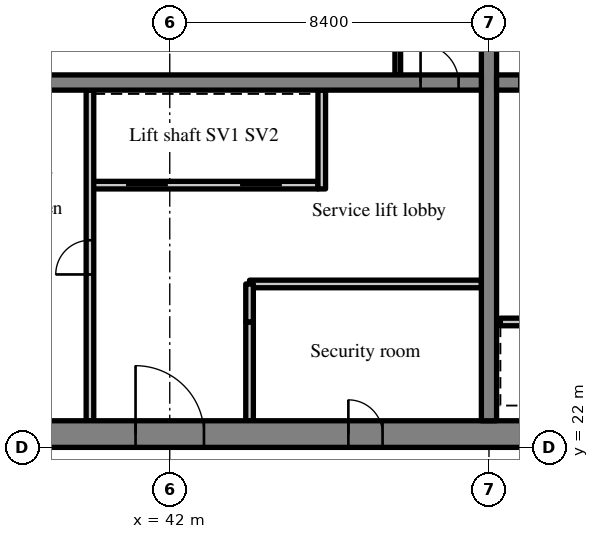
"""IFC4 building model, lengths in metres.
Left out: names, types, materials, properties, quantities, classifications, styles, units other than length and angle.
Written with IfcOpenShell. Run it as: python <this file> out.ifc"""

import sys

from ifc_helpers import new_model, si_unit, direction, frame, frame_2d, origin, place, context, subcontext, project, spatial, rectangle, extrude, source, transform, mapped, element, fill, save


model = new_model("IFC4")
c1 = context("Model", 3, precision=1e-05, world=origin(), true_north=direction((0.0, 1.0)))
c2 = subcontext(c1, "Body", "Model", "MODEL_VIEW")
j1 = project(units=[si_unit("LENGTHUNIT", "METRE"), si_unit("PLANEANGLEUNIT", "RADIAN")], contexts=[c1])
p1 = place(None, origin())
s1 = spatial("IfcSite", under=j1, at=p1, CompositionType="ELEMENT")
p2 = place(p1, origin())
s2 = spatial("IfcBuilding", under=s1, at=p2, CompositionType="ELEMENT")
p3 = place(p2, frame((0.0, 0.0, 163.0)))
s3 = spatial("IfcBuildingStorey", under=s2, at=p3, CompositionType="ELEMENT", Elevation=163.0)
m1 = source(origin(), c2, "Body", "SweptSolid", [
    extrude(rectangle(XDim=50.4, YDim=0.7, at=frame_2d((25.2, 0.0))), origin(), (0.0, 0.0, 1.0), 3.52),
])
p4 = place(p3, frame((25.2, 22.35, 0.0), z_axis=(0.0, 0.0, 1.0), x_axis=(1.0, 0.0, 0.0)))
e1 = element("IfcWall", 1, at=p4, inside=s3, PredefinedType="SHEAR", context=c2, shape_type="MappedRepresentation", body=[
    mapped(m1, transform((0.0, 0.0, 0.0), scale=1.0)),
])
m2 = source(origin(), c2, "Body", "SweptSolid", [
    extrude(rectangle(XDim=1.8, YDim=2.1, at=frame_2d((0.9, 1.05))), frame((0.0, 0.36, 0.0), z_axis=(0.0, -1.0, 0.0), x_axis=(1.0, 0.0, 0.0)), (0.0, 0.0, 1.0), 0.72),
])
p5 = place(p4, frame((15.9, 0.0, 0.0)))
e2 = element("IfcOpeningElement", 2, at=p5, cuts=e1, PredefinedType="OPENING", context=c2, shape_type="MappedRepresentation", body=[
    mapped(m2, transform((0.0, 0.0, 0.0), scale=1.0)),
])
m3 = source(origin(), c2, "Body", "SweptSolid", [
    extrude(rectangle(XDim=0.9, YDim=2.1, at=frame_2d((0.45, 1.05))), frame((0.0, 0.36, 0.0), z_axis=(0.0, -1.0, 0.0), x_axis=(1.0, 0.0, 0.0)), (0.0, 0.0, 1.0), 0.72),
])
p6 = place(p4, frame((9.7, 0.0, 0.0)))
e3 = element("IfcOpeningElement", 3, at=p6, cuts=e1, PredefinedType="OPENING", context=c2, shape_type="MappedRepresentation", body=[
    mapped(m3, transform((0.0, 0.0, 0.0), scale=1.0)),
])
p7 = place(p4, frame((21.5, 0.0, 0.0)))
e4 = element("IfcOpeningElement", 4, at=p7, cuts=e1, PredefinedType="OPENING", context=c2, shape_type="MappedRepresentation", body=[
    mapped(m3, transform((0.0, 0.0, 0.0), scale=1.0)),
])
p8 = place(p4, frame((32.7, 0.0, 0.0)))
e5 = element("IfcOpeningElement", 5, at=p8, cuts=e1, PredefinedType="OPENING", context=c2, shape_type="MappedRepresentation", body=[
    mapped(m2, transform((0.0, 0.0, 0.0), scale=1.0)),
])
m4 = source(origin(), c2, "Body", "SweptSolid", [
    extrude(rectangle(XDim=1.2, YDim=2.1, at=frame_2d((0.6, 1.05))), frame((0.0, 0.36, 0.0), z_axis=(0.0, -1.0, 0.0), x_axis=(1.0, 0.0, 0.0)), (0.0, 0.0, 1.0), 0.72),
])
p9 = place(p4, frame((6.475, 0.0, 0.0)))
e6 = element("IfcOpeningElement", 6, at=p9, cuts=e1, PredefinedType="OPENING", context=c2, shape_type="MappedRepresentation", body=[
    mapped(m4, transform((0.0, 0.0, 0.0), scale=1.0)),
])
p10 = place(p4, frame((47.875, 0.0, 0.0)))
e7 = element("IfcOpeningElement", 7, at=p10, cuts=e1, PredefinedType="OPENING", context=c2, shape_type="MappedRepresentation", body=[
    mapped(m4, transform((0.0, 0.0, 0.0), scale=1.0)),
])
m5 = source(origin(), c2, "Body", "SweptSolid", [
    extrude(rectangle(XDim=18.6, YDim=0.4, at=frame_2d((9.3, 0.0))), origin(), (0.0, 0.0, 1.0), 3.52),
])
p11 = place(p3, frame((50.4, 22.7, 0.0), z_axis=(0.0, 0.0, 1.0), x_axis=(0.0, 1.0, 0.0)))
e8 = element("IfcWall", 8, at=p11, inside=s3, PredefinedType="SHEAR", context=c2, shape_type="MappedRepresentation", body=[
    mapped(m5, transform((0.0, 0.0, 0.0), scale=1.0)),
])
m6 = source(origin(), c2, "Body", "SweptSolid", [
    extrude(rectangle(XDim=1.1, YDim=2.1, at=frame_2d((0.55, 1.05))), frame((0.0, 0.21, 0.0), z_axis=(0.0, -1.0, 0.0), x_axis=(1.0, 0.0, 0.0)), (0.0, 0.0, 1.0), 0.42),
])
p12 = place(p11, frame((12.75, 0.0, 0.0)))
e9 = element("IfcOpeningElement", 9, at=p12, cuts=e8, PredefinedType="OPENING", context=c2, shape_type="MappedRepresentation", body=[
    mapped(m6, transform((0.0, 0.0, 0.0), scale=1.0)),
])
m7 = source(origin(), c2, "Body", "SweptSolid", [
    extrude(rectangle(XDim=16.4, YDim=0.4, at=frame_2d((8.2, 0.0))), origin(), (0.0, 0.0, 1.0), 3.52),
])
p13 = place(p3, frame((33.8, 31.6, 0.0), z_axis=(0.0, 0.0, 1.0), x_axis=(1.0, 0.0, 0.0)))
e10 = element("IfcWall", 10, at=p13, inside=s3, PredefinedType="SHEAR", context=c2, shape_type="MappedRepresentation", body=[
    mapped(m7, transform((0.0, 0.0, 0.0), scale=1.0)),
])
m8 = source(origin(), c2, "Body", "SweptSolid", [
    extrude(rectangle(XDim=1.0, YDim=2.1, at=frame_2d((0.5, 1.05))), frame((0.0, 0.21, 0.0), z_axis=(0.0, -1.0, 0.0), x_axis=(1.0, 0.0, 0.0)), (0.0, 0.0, 1.0), 0.42),
])
p14 = place(p13, frame((14.8, 0.0, 0.0)))
e11 = element("IfcOpeningElement", 11, at=p14, cuts=e10, PredefinedType="OPENING", context=c2, shape_type="MappedRepresentation", body=[
    mapped(m8, transform((0.0, 0.0, 0.0), scale=1.0)),
])
p15 = place(p3, frame((50.6, 31.6, 0.0), z_axis=(0.0, 0.0, 1.0), x_axis=(1.0, 0.0, 0.0)))
e12 = element("IfcWall", 12, at=p15, inside=s3, PredefinedType="SHEAR", context=c2, shape_type="MappedRepresentation", body=[
    mapped(m7, transform((0.0, 0.0, 0.0), scale=1.0)),
])
p16 = place(p15, frame((0.6, 0.0, 0.0)))
e13 = element("IfcOpeningElement", 13, at=p16, cuts=e12, PredefinedType="OPENING", context=c2, shape_type="MappedRepresentation", body=[
    mapped(m8, transform((0.0, 0.0, 0.0), scale=1.0)),
])
m9 = source(origin(), c2, "Body", "SweptSolid", [
    extrude(rectangle(XDim=6.0, YDim=0.2, at=frame_2d((3.0, 0.0))), origin(), (0.0, 0.0, 1.0), 3.52),
])
p17 = place(p3, frame((39.9, 28.9, 0.0), z_axis=(0.0, 0.0, 1.0), x_axis=(1.0, 0.0, 0.0)))
e14 = element("IfcWall", 14, at=p17, inside=s3, PredefinedType="SOLIDWALL", context=c2, shape_type="MappedRepresentation", body=[
    mapped(m9, transform((0.0, 0.0, 0.0), scale=1.0)),
])
m10 = source(origin(), c2, "Body", "SweptSolid", [
    extrude(rectangle(XDim=1.1, YDim=2.1, at=frame_2d((0.55, 1.05))), frame((0.0, 0.11, 0.0), z_axis=(0.0, -1.0, 0.0), x_axis=(1.0, 0.0, 0.0)), (0.0, 0.0, 1.0), 0.22),
])
p18 = place(p17, frame((0.95, 0.0, 0.0)))
e15 = element("IfcOpeningElement", 15, at=p18, cuts=e14, PredefinedType="OPENING", context=c2, shape_type="MappedRepresentation", body=[
    mapped(m10, transform((0.0, 0.0, 0.0), scale=1.0)),
])
p19 = place(p17, frame((3.95, 0.0, 0.0)))
e16 = element("IfcOpeningElement", 16, at=p19, cuts=e14, PredefinedType="OPENING", context=c2, shape_type="MappedRepresentation", body=[
    mapped(m10, transform((0.0, 0.0, 0.0), scale=1.0)),
])
m11 = source(origin(), c2, "Body", "SweptSolid", [
    extrude(rectangle(XDim=8.7, YDim=0.2, at=frame_2d((4.35, 0.0))), origin(), (0.0, 0.0, 1.0), 3.52),
])
p20 = place(p3, frame((39.9, 22.7, 0.0), z_axis=(0.0, 0.0, 1.0), x_axis=(0.0, 1.0, 0.0)))
e17 = element("IfcWall", 17, at=p20, inside=s3, PredefinedType="PARTITIONING", context=c2, shape_type="MappedRepresentation", body=[
    mapped(m11, transform((0.0, 0.0, 0.0), scale=1.0)),
])
m12 = source(origin(), c2, "Body", "SweptSolid", [
    extrude(rectangle(XDim=0.9, YDim=2.1, at=frame_2d((0.45, 1.05))), frame((0.0, 0.11, 0.0), z_axis=(0.0, -1.0, 0.0), x_axis=(1.0, 0.0, 0.0)), (0.0, 0.0, 1.0), 0.22),
])
p21 = place(p20, frame((3.85, 0.0, 0.0)))
e18 = element("IfcOpeningElement", 18, at=p21, cuts=e17, PredefinedType="OPENING", context=c2, shape_type="MappedRepresentation", body=[
    mapped(m12, transform((0.0, 0.0, 0.0), scale=1.0)),
])
m13 = source(origin(), c2, "Body", "SweptSolid", [
    extrude(rectangle(XDim=2.6, YDim=0.2, at=frame_2d((1.3, 0.0))), origin(), (0.0, 0.0, 1.0), 3.52),
])
p22 = place(p3, frame((44.1, 22.7, 0.0), z_axis=(0.0, 0.0, 1.0), x_axis=(0.0, 1.0, 0.0)))
e19 = element("IfcWall", 19, at=p22, inside=s3, PredefinedType="PARTITIONING", context=c2, shape_type="MappedRepresentation", body=[
    mapped(m13, transform((0.0, 0.0, 0.0), scale=1.0)),
])
m14 = source(origin(), c2, "Body", "SweptSolid", [
    extrude(rectangle(XDim=2.6, YDim=0.2, at=frame_2d((1.3, 0.0))), origin(), (0.0, 0.0, 1.0), 3.52),
])
p23 = place(p3, frame((46.0, 28.8, 0.0), z_axis=(0.0, 0.0, 1.0), x_axis=(0.0, 1.0, 0.0)))
e20 = element("IfcWall", 20, at=p23, inside=s3, PredefinedType="SOLIDWALL", context=c2, shape_type="MappedRepresentation", body=[
    mapped(m14, transform((0.0, 0.0, 0.0), scale=1.0)),
])
m15 = source(origin(), c2, "Body", "SweptSolid", [
    extrude(rectangle(XDim=6.1, YDim=0.2, at=frame_2d((3.05, 0.0))), origin(), (0.0, 0.0, 1.0), 3.52),
])
p24 = place(p3, frame((44.1, 26.3, 0.0), z_axis=(0.0, 0.0, 1.0), x_axis=(1.0, 0.0, 0.0)))
e21 = element("IfcWall", 21, at=p24, inside=s3, PredefinedType="PARTITIONING", context=c2, shape_type="MappedRepresentation", body=[
    mapped(m15, transform((0.0, 0.0, 0.0), scale=1.0)),
])
m16 = source(origin(), c2, "Body", "SweptSolid", [
    extrude(rectangle(XDim=1.0, YDim=0.2, at=frame_2d((0.5, 0.0))), origin(), (0.0, 0.0, 1.0), 3.52),
])
p25 = place(p3, frame((44.1, 25.3, 0.0), z_axis=(0.0, 0.0, 1.0), x_axis=(0.0, 1.0, 0.0)))
e22 = element("IfcWall", 22, at=p25, inside=s3, PredefinedType="PARTITIONING", context=c2, shape_type="MappedRepresentation", body=[
    mapped(m16, transform((0.0, 0.0, 0.0), scale=1.0)),
])
m17 = source(origin(), c2, "Body", "SweptSolid", [
    extrude(rectangle(XDim=3.2, YDim=0.15, at=frame_2d((1.6, 0.0))), origin(), (0.0, 0.0, 1.0), 3.52),
])
p26 = place(p3, frame((48.0, 31.8, 0.0), z_axis=(0.0, 0.0, 1.0), x_axis=(0.0, 1.0, 0.0)))
e23 = element("IfcWall", 23, at=p26, inside=s3, PredefinedType="PARTITIONING", context=c2, shape_type="MappedRepresentation", body=[
    mapped(m17, transform((0.0, 0.0, 0.0), scale=1.0)),
])
p27 = place(p3, frame((56.7, 25.3, 0.0), z_axis=(0.0, 0.0, 1.0), x_axis=(-1.0, 0.0, 0.0)))
e24 = element("IfcWall", 24, at=p27, inside=s3, PredefinedType="SOLIDWALL", context=c2, shape_type="MappedRepresentation", body=[
    mapped(m9, transform((0.0, 0.0, 0.0), scale=1.0)),
])
p28 = place(p27, frame((0.95, 0.0, 0.0)))
e25 = element("IfcOpeningElement", 25, at=p28, cuts=e24, PredefinedType="OPENING", context=c2, shape_type="MappedRepresentation", body=[
    mapped(m10, transform((0.0, 0.0, 0.0), scale=1.0)),
])
p29 = place(p27, frame((3.95, 0.0, 0.0)))
e26 = element("IfcOpeningElement", 26, at=p29, cuts=e24, PredefinedType="OPENING", context=c2, shape_type="MappedRepresentation", body=[
    mapped(m10, transform((0.0, 0.0, 0.0), scale=1.0)),
])
m18 = source(origin(), c2, "Body", "SweptSolid", [
    extrude(rectangle(XDim=1.8, YDim=2.1, at=frame_2d((0.9, 1.05))), frame((0.0, 0.275, 0.0), z_axis=(0.0, -1.0, 0.0), x_axis=(1.0, 0.0, 0.0)), (0.0, 0.0, 1.0), 0.05),
])
p30 = place(p5, origin())
e27 = element("IfcDoor", 27, at=p30, inside=s3, OperationType="DOUBLE_DOOR_SINGLE_SWING", PredefinedType="DOOR", context=c2, shape_type="MappedRepresentation", body=[
    mapped(m18, transform((0.0, 0.0, 0.0), scale=1.0)),
])
fill(e2, e27)
m19 = source(origin(), c2, "Body", "SweptSolid", [
    extrude(rectangle(XDim=1.0, YDim=2.1, at=frame_2d((0.5, 1.05))), frame((0.0, 0.025, 0.0), z_axis=(0.0, -1.0, 0.0), x_axis=(1.0, 0.0, 0.0)), (0.0, 0.0, 1.0), 0.05),
])
p31 = place(p14, origin())
e28 = element("IfcDoor", 28, at=p31, inside=s3, OperationType="SINGLE_SWING_LEFT", PredefinedType="DOOR", context=c2, shape_type="MappedRepresentation", body=[
    mapped(m19, transform((0.0, 0.0, 0.0), scale=1.0)),
])
fill(e11, e28)
m20 = source(origin(), c2, "Body", "SweptSolid", [
    extrude(rectangle(XDim=1.1, YDim=2.1, at=frame_2d((0.55, 1.05))), frame((0.0, 0.025, 0.0), z_axis=(0.0, -1.0, 0.0), x_axis=(1.0, 0.0, 0.0)), (0.0, 0.0, 1.0), 0.05),
])
p32 = place(p18, origin())
e29 = element("IfcDoor", 29, at=p32, inside=s3, OperationType="SLIDING_TO_LEFT", PredefinedType="DOOR", context=c2, shape_type="MappedRepresentation", body=[
    mapped(m20, transform((0.0, 0.0, 0.0), scale=1.0)),
])
fill(e15, e29)
p33 = place(p19, origin())
e30 = element("IfcDoor", 30, at=p33, inside=s3, OperationType="SLIDING_TO_RIGHT", PredefinedType="DOOR", context=c2, shape_type="MappedRepresentation", body=[
    mapped(m20, transform((0.0, 0.0, 0.0), scale=1.0)),
])
fill(e16, e30)
m21 = source(origin(), c2, "Body", "SweptSolid", [
    extrude(rectangle(XDim=0.9, YDim=2.1, at=frame_2d((0.45, 1.05))), frame((0.0, 0.025, 0.0), z_axis=(0.0, -1.0, 0.0), x_axis=(1.0, 0.0, 0.0)), (0.0, 0.0, 1.0), 0.05),
])
p34 = place(p21, origin())
e31 = element("IfcDoor", 31, at=p34, inside=s3, OperationType="SINGLE_SWING_LEFT", PredefinedType="DOOR", context=c2, shape_type="MappedRepresentation", body=[
    mapped(m21, transform((0.0, 0.0, 0.0), scale=1.0)),
])
fill(e18, e31)
m22 = source(origin(), c2, "Body", "SweptSolid", [
    extrude(rectangle(XDim=0.9, YDim=2.1, at=frame_2d((0.45, 1.05))), frame((0.0, 0.275, 0.0), z_axis=(0.0, -1.0, 0.0), x_axis=(1.0, 0.0, 0.0)), (0.0, 0.0, 1.0), 0.05),
])
p35 = place(p7, origin())
e32 = element("IfcDoor", 32, at=p35, inside=s3, OperationType="SINGLE_SWING_LEFT", PredefinedType="DOOR", context=c2, shape_type="MappedRepresentation", body=[
    mapped(m22, transform((0.0, 0.0, 0.0), scale=1.0)),
])
fill(e4, e32)
save(model, sys.argv[1])
